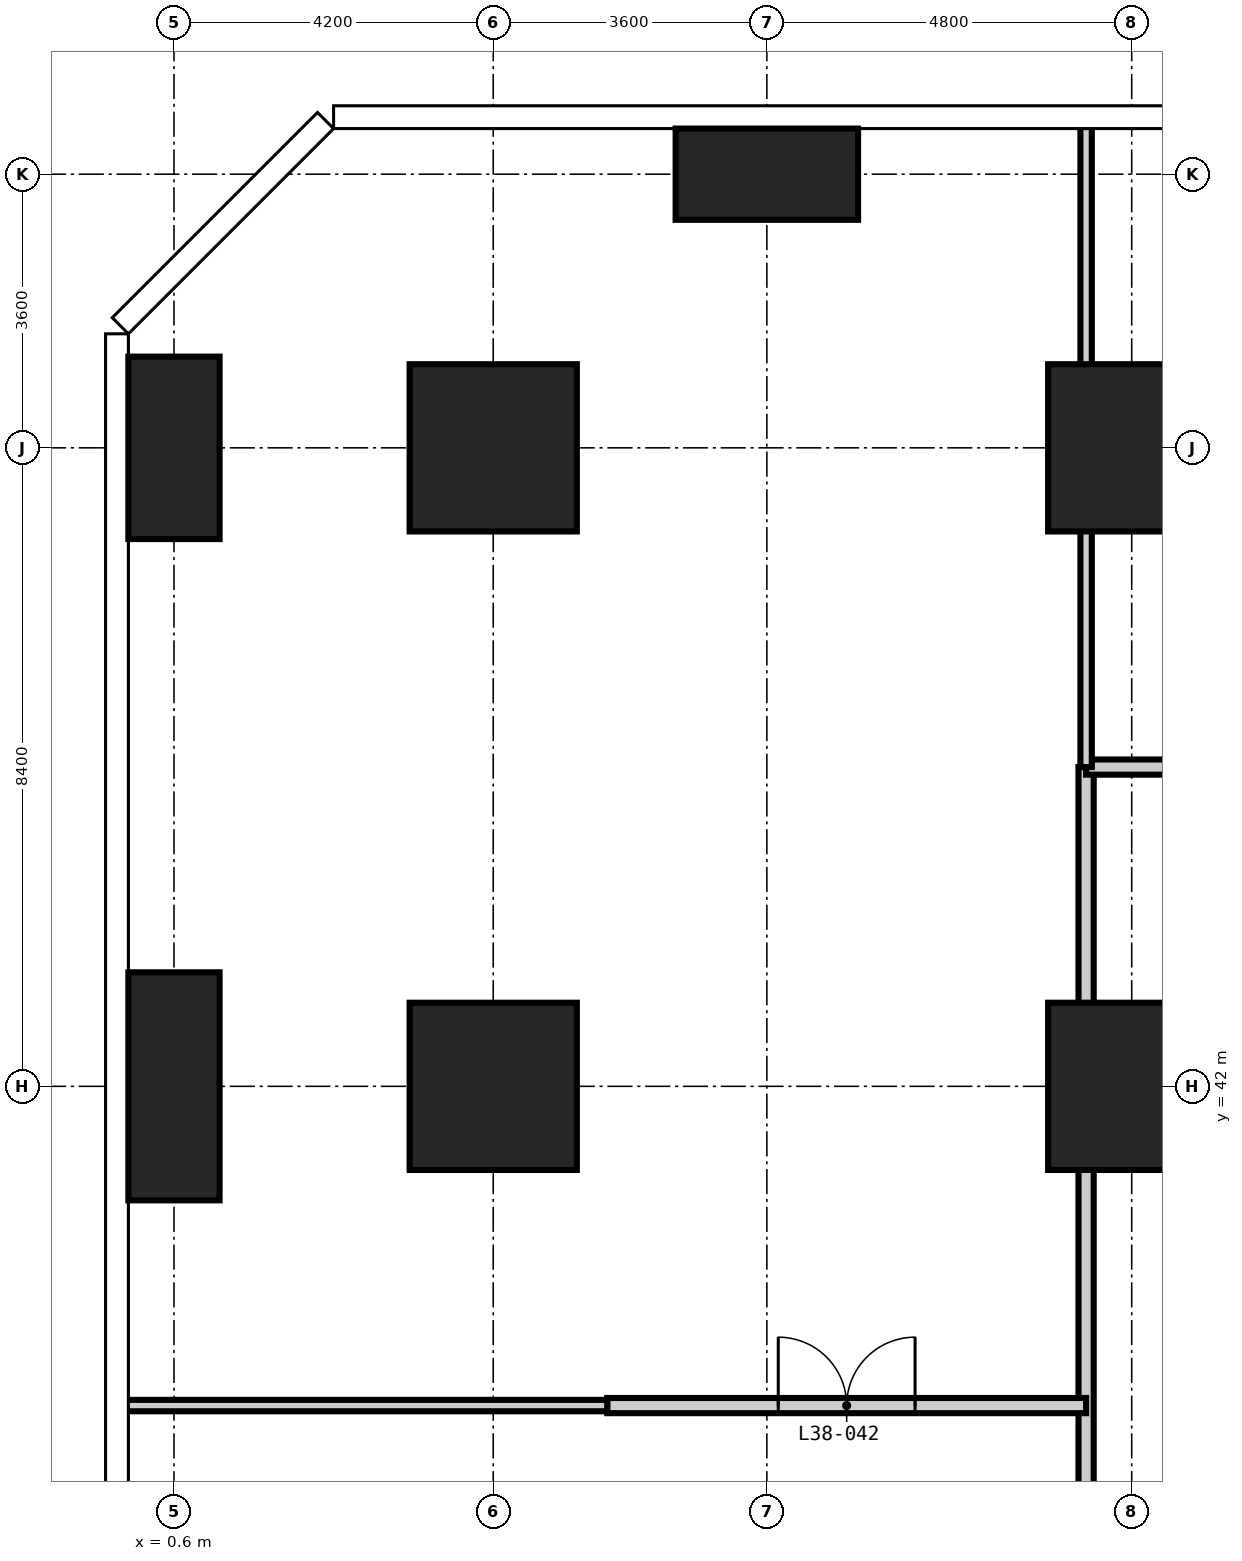
"""IFC4 building model, lengths in metres.
Left out: names, types, materials, properties, quantities, classifications, styles, units other than length and angle.
Written with IfcOpenShell. Run it as: python <this file> out.ifc"""

import sys

from ifc_helpers import new_model, si_unit, direction, frame, frame_2d, origin, origin_2d, place, context, subcontext, project, spatial, rectangle, extrude, element, fill, save


model = new_model("IFC4")
c1 = context("Model", 3, precision=1e-05, world=origin(), true_north=direction((0.0, 1.0)))
c2 = subcontext(c1, "Body", "Model", "MODEL_VIEW")
j1 = project(units=[si_unit("LENGTHUNIT", "METRE"), si_unit("PLANEANGLEUNIT", "RADIAN")], contexts=[c1])
p1 = place(None, origin())
s1 = spatial("IfcSite", under=j1, at=p1, CompositionType="ELEMENT")
p2 = place(p1, origin())
s2 = spatial("IfcBuilding", under=s1, at=p2, CompositionType="ELEMENT")
p3 = place(p2, frame((0.0, 0.0, 147.6)))
s3 = spatial("IfcBuildingStorey", under=s2, at=p3, CompositionType="ELEMENT", Elevation=147.6)
p4 = place(p3, frame((0.6, 42.0, -0.35), z_axis=(0.0, 0.0, 1.0), x_axis=(1.0, 0.0, 0.0)))
e1 = element("IfcColumn", 1, at=p4, inside=s3, PredefinedType="COLUMN", context=c2, shape_type="SweptSolid", body=[
    extrude(rectangle(XDim=1.2, YDim=3.0, at=origin_2d()), origin(), (0.0, 0.0, 1.0), 5.95),
])
p5 = place(p3, frame((0.6, 50.4, -0.35), z_axis=(0.0, 0.0, 1.0), x_axis=(1.0, 0.0, 0.0)))
e2 = element("IfcColumn", 2, at=p5, inside=s3, PredefinedType="COLUMN", context=c2, shape_type="SweptSolid", body=[
    extrude(rectangle(XDim=1.2, YDim=2.4, at=origin_2d()), origin(), (0.0, 0.0, 1.0), 5.95),
])
for number, where, z_axis, x_axis in (
    (3, (4.8, 42.0, -0.35), (0.0, 0.0, 1.0), (1.0, 0.0, 0.0)),
    (4, (4.8, 50.4, -0.35), (0.0, 0.0, 1.0), (1.0, 0.0, 0.0)),
):
    element("IfcColumn", number, at=place(p3, frame(where, z_axis=z_axis, x_axis=x_axis)), inside=s3, PredefinedType="COLUMN", context=c2, shape_type="SweptSolid", body=[
        extrude(rectangle(XDim=2.2, YDim=2.2, at=origin_2d()), origin(), (0.0, 0.0, 1.0), 5.95),
    ])
p6 = place(p3, frame((8.4, 54.0, -0.35), z_axis=(0.0, 0.0, 1.0), x_axis=(1.0, 0.0, 0.0)))
e5 = element("IfcColumn", 5, at=p6, inside=s3, PredefinedType="COLUMN", context=c2, shape_type="SweptSolid", body=[
    extrude(rectangle(XDim=2.4, YDim=1.2, at=origin_2d()), origin(), (0.0, 0.0, 1.0), 5.95),
])
for number, where, z_axis, x_axis in (
    (6, (13.2, 42.0, -0.35), (0.0, 0.0, 1.0), (1.0, 0.0, 0.0)),
    (7, (13.2, 50.4, -0.35), (0.0, 0.0, 1.0), (1.0, 0.0, 0.0)),
):
    element("IfcColumn", number, at=place(p3, frame(where, z_axis=z_axis, x_axis=x_axis)), inside=s3, PredefinedType="COLUMN", context=c2, shape_type="SweptSolid", body=[
        extrude(rectangle(XDim=2.2, YDim=2.2, at=origin_2d()), origin(), (0.0, 0.0, 1.0), 5.95),
    ])
p7 = place(p3, frame((12.6, 33.6, 0.0), z_axis=(0.0, 0.0, 1.0), x_axis=(0.0, 1.0, 0.0)))
e8 = element("IfcWall", 8, at=p7, inside=s3, PredefinedType="PARTITIONING", context=c2, shape_type="SweptSolid", body=[
    extrude(rectangle(XDim=12.6, YDim=0.2, at=frame_2d((6.3, 0.0))), origin(), (0.0, 0.0, 1.0), 5.6),
])
p8 = place(p3, frame((6.3, 37.8, 0.0), z_axis=(0.0, 0.0, 1.0), x_axis=(1.0, 0.0, 0.0)))
e9 = element("IfcWall", 9, at=p8, inside=s3, PredefinedType="PARTITIONING", context=c2, shape_type="SweptSolid", body=[
    extrude(rectangle(XDim=6.3, YDim=0.2, at=frame_2d((3.15, 0.0))), origin(), (0.0, 0.0, 1.0), 5.6),
])
p9 = place(p8, frame((2.25, 0.0, 0.0)))
e10 = element("IfcOpeningElement", 10, at=p9, cuts=e9, PredefinedType="OPENING", context=c2, shape_type="SweptSolid", body=[
    extrude(rectangle(XDim=1.8, YDim=2.4, at=frame_2d((0.9, 1.2))), frame((0.0, 0.11, 0.0), z_axis=(0.0, -1.0, 0.0), x_axis=(1.0, 0.0, 0.0)), (0.0, 0.0, 1.0), 0.22),
])
p10 = place(p3, frame((12.6, 42.0, 0.0), z_axis=(0.0, 0.0, 1.0), x_axis=(1.0, 0.0, 0.0)))
e11 = element("IfcWall", 11, at=p10, inside=s3, PredefinedType="PARTITIONING", context=c2, shape_type="SweptSolid", body=[
    extrude(rectangle(XDim=4.2, YDim=0.2, at=frame_2d((2.1, 0.0))), origin(), (0.0, 0.0, 1.0), 5.6),
])
p11 = place(p10, frame((1.8, 0.0, 0.0)))
e12 = element("IfcOpeningElement", 12, at=p11, cuts=e11, PredefinedType="OPENING", context=c2, shape_type="SweptSolid", body=[
    extrude(rectangle(XDim=1.0, YDim=2.1, at=frame_2d((0.5, 1.05))), frame((0.0, 0.11, 0.0), z_axis=(0.0, -1.0, 0.0), x_axis=(1.0, 0.0, 0.0)), (0.0, 0.0, 1.0), 0.22),
])
p12 = place(p3, frame((12.6, 46.2, 0.0), z_axis=(0.0, 0.0, 1.0), x_axis=(1.0, 0.0, 0.0)))
e13 = element("IfcWall", 13, at=p12, inside=s3, PredefinedType="PARTITIONING", context=c2, shape_type="SweptSolid", body=[
    extrude(rectangle(XDim=29.4, YDim=0.2, at=frame_2d((14.7, 0.0))), origin(), (0.0, 0.0, 1.0), 5.6),
])
p13 = place(p12, frame((5.55, 0.0, 0.0)))
e14 = element("IfcOpeningElement", 14, at=p13, cuts=e13, PredefinedType="OPENING", context=c2, shape_type="SweptSolid", body=[
    extrude(rectangle(XDim=0.9, YDim=2.1, at=frame_2d((0.45, 1.05))), frame((0.0, 0.11, 0.0), z_axis=(0.0, -1.0, 0.0), x_axis=(1.0, 0.0, 0.0)), (0.0, 0.0, 1.0), 0.22),
])
p14 = place(p12, frame((9.15, 0.0, 0.0)))
e15 = element("IfcOpeningElement", 15, at=p14, cuts=e13, PredefinedType="OPENING", context=c2, shape_type="SweptSolid", body=[
    extrude(rectangle(XDim=0.9, YDim=2.1, at=frame_2d((0.45, 1.05))), frame((0.0, 0.11, 0.0), z_axis=(0.0, -1.0, 0.0), x_axis=(1.0, 0.0, 0.0)), (0.0, 0.0, 1.0), 0.22),
])
p15 = place(p12, frame((12.1, 0.0, 0.0)))
e16 = element("IfcOpeningElement", 16, at=p15, cuts=e13, PredefinedType="OPENING", context=c2, shape_type="SweptSolid", body=[
    extrude(rectangle(XDim=1.0, YDim=2.1, at=frame_2d((0.5, 1.05))), frame((0.0, 0.11, 0.0), z_axis=(0.0, -1.0, 0.0), x_axis=(1.0, 0.0, 0.0)), (0.0, 0.0, 1.0), 0.22),
])
p16 = place(p12, frame((15.8, 0.0, 0.0)))
e17 = element("IfcOpeningElement", 17, at=p16, cuts=e13, PredefinedType="OPENING", context=c2, shape_type="SweptSolid", body=[
    extrude(rectangle(XDim=1.0, YDim=2.1, at=frame_2d((0.5, 1.05))), frame((0.0, 0.11, 0.0), z_axis=(0.0, -1.0, 0.0), x_axis=(1.0, 0.0, 0.0)), (0.0, 0.0, 1.0), 0.22),
])
p17 = place(p12, frame((20.975, 0.0, 0.0)))
e18 = element("IfcOpeningElement", 18, at=p17, cuts=e13, PredefinedType="OPENING", context=c2, shape_type="SweptSolid", body=[
    extrude(rectangle(XDim=1.0, YDim=2.1, at=frame_2d((0.5, 1.05))), frame((0.0, 0.11, 0.0), z_axis=(0.0, -1.0, 0.0), x_axis=(1.0, 0.0, 0.0)), (0.0, 0.0, 1.0), 0.22),
])
p18 = place(p12, frame((26.275, 0.0, 0.0)))
e19 = element("IfcOpeningElement", 19, at=p18, cuts=e13, PredefinedType="OPENING", context=c2, shape_type="SweptSolid", body=[
    extrude(rectangle(XDim=1.0, YDim=2.1, at=frame_2d((0.5, 1.05))), frame((0.0, 0.11, 0.0), z_axis=(0.0, -1.0, 0.0), x_axis=(1.0, 0.0, 0.0)), (0.0, 0.0, 1.0), 0.22),
])
p19 = place(p12, frame((1.6, 0.0, 0.0)))
e20 = element("IfcOpeningElement", 20, at=p19, cuts=e13, PredefinedType="OPENING", context=c2, shape_type="SweptSolid", body=[
    extrude(rectangle(XDim=1.0, YDim=2.1, at=frame_2d((0.5, 1.05))), frame((0.0, 0.11, 0.0), z_axis=(0.0, -1.0, 0.0), x_axis=(1.0, 0.0, 0.0)), (0.0, 0.0, 1.0), 0.22),
])
p20 = place(p3, frame((12.6, 46.2, 0.0), z_axis=(0.0, 0.0, 1.0), x_axis=(0.0, 1.0, 0.0)))
e21 = element("IfcWall", 21, at=p20, inside=s3, PredefinedType="PARTITIONING", context=c2, shape_type="SweptSolid", body=[
    extrude(rectangle(XDim=8.438, YDim=0.15, at=frame_2d((4.219, 0.0))), origin(), (0.0, 0.0, 1.0), 5.6),
])
p21 = place(p3, frame((-0.038, 37.8, 0.0), z_axis=(0.0, 0.0, 1.0), x_axis=(1.0, 0.0, 0.0)))
e22 = element("IfcWall", 22, at=p21, inside=s3, PredefinedType="PARTITIONING", context=c2, shape_type="SweptSolid", body=[
    extrude(rectangle(XDim=6.338, YDim=0.15, at=frame_2d((3.169, 0.0))), origin(), (0.0, 0.0, 1.0), 5.6),
])
p22 = place(p9, origin())
e23 = element("IfcDoor", 23, at=p22, inside=s3, OperationType="DOUBLE_DOOR_DOUBLE_SWING", PredefinedType="DOOR", context=c2, shape_type="SweptSolid", body=[
    extrude(rectangle(XDim=1.8, YDim=2.4, at=frame_2d((0.9, 1.2))), frame((0.0, 0.025, 0.0), z_axis=(0.0, -1.0, 0.0), x_axis=(1.0, 0.0, 0.0)), (0.0, 0.0, 1.0), 0.05),
])
fill(e10, e23)
save(model, sys.argv[1])
